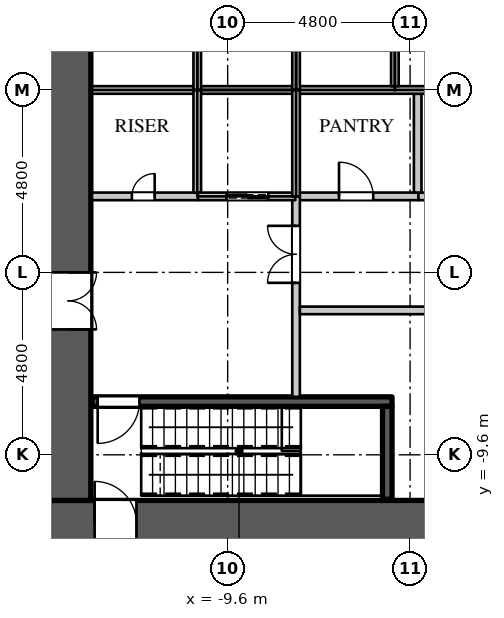
"""IFC4 building model, lengths in metres.
Left out: names, types, materials, properties, quantities, classifications, styles, units other than length and angle.
Written with IfcOpenShell. Run it as: python <this file> out.ifc"""

import sys

from ifc_helpers import new_model, si_unit, direction, frame, frame_2d, origin, place, context, subcontext, project, spatial, rectangle, extrude, element, fill, save


model = new_model("IFC4")
c1 = context("Model", 3, precision=1e-05, world=origin(), true_north=direction((0.0, 1.0)))
c2 = subcontext(c1, "Body", "Model", "MODEL_VIEW")
j1 = project(units=[si_unit("LENGTHUNIT", "METRE"), si_unit("PLANEANGLEUNIT", "RADIAN")], contexts=[c1])
p1 = place(None, origin())
s1 = spatial("IfcSite", under=j1, at=p1, CompositionType="ELEMENT")
p2 = place(p1, origin())
s2 = spatial("IfcBuilding", under=s1, at=p2, CompositionType="ELEMENT")
p3 = place(p2, frame((0.0, 0.0, 6.0)))
s3 = spatial("IfcBuildingStorey", under=s2, at=p3, CompositionType="ELEMENT", Elevation=6.0)
p4 = place(p3, frame((-14.4, -11.4, 0.0), z_axis=(0.0, 0.0, 1.0), x_axis=(1.0, 0.0, 0.0)))
e1 = element("IfcWall", 1, at=p4, inside=s3, PredefinedType="SHEAR", context=c2, shape_type="SweptSolid", body=[
    extrude(rectangle(XDim=28.8, YDim=1.2, at=frame_2d((14.4, 0.0))), origin(), (0.0, 0.0, 1.0), 5.0),
])
p5 = place(p4, frame((1.3, 0.0, 0.0)))
e2 = element("IfcOpeningElement", 2, at=p5, cuts=e1, PredefinedType="OPENING", context=c2, shape_type="SweptSolid", body=[
    extrude(rectangle(XDim=1.1, YDim=2.2, at=frame_2d((0.55, 1.1))), frame((0.0, 0.61, 0.0), z_axis=(0.0, -1.0, 0.0), x_axis=(1.0, 0.0, 0.0)), (0.0, 0.0, 1.0), 1.22),
])
p6 = place(p4, frame((26.4, 0.0, 0.0)))
e3 = element("IfcOpeningElement", 3, at=p6, cuts=e1, PredefinedType="OPENING", context=c2, shape_type="SweptSolid", body=[
    extrude(rectangle(XDim=1.1, YDim=2.2, at=frame_2d((0.55, 1.1))), frame((0.0, 0.61, 0.0), z_axis=(0.0, -1.0, 0.0), x_axis=(1.0, 0.0, 0.0)), (0.0, 0.0, 1.0), 1.22),
])
p7 = place(p3, frame((-13.8, -10.8, 0.0), z_axis=(0.0, 0.0, 1.0), x_axis=(0.0, 1.0, 0.0)))
e4 = element("IfcWall", 4, at=p7, inside=s3, PredefinedType="SHEAR", context=c2, shape_type="SweptSolid", body=[
    extrude(rectangle(XDim=21.6, YDim=1.2, at=frame_2d((10.8, 0.0))), origin(), (0.0, 0.0, 1.0), 5.0),
])
p8 = place(p7, frame((15.5, 0.0, 0.0)))
e5 = element("IfcOpeningElement", 5, at=p8, cuts=e4, PredefinedType="OPENING", context=c2, shape_type="SweptSolid", body=[
    extrude(rectangle(XDim=1.5, YDim=2.4, at=frame_2d((0.75, 1.2))), frame((0.0, 0.61, 0.0), z_axis=(0.0, -1.0, 0.0), x_axis=(1.0, 0.0, 0.0)), (0.0, 0.0, 1.0), 1.22),
])
p9 = place(p7, frame((4.5, 0.0, 0.0)))
e6 = element("IfcOpeningElement", 6, at=p9, cuts=e4, PredefinedType="OPENING", context=c2, shape_type="SweptSolid", body=[
    extrude(rectangle(XDim=1.5, YDim=2.4, at=frame_2d((0.75, 1.2))), frame((0.0, 0.61, 0.0), z_axis=(0.0, -1.0, 0.0), x_axis=(1.0, 0.0, 0.0)), (0.0, 0.0, 1.0), 1.22),
])
p10 = place(p3, frame((-7.82, -2.8, 0.0), z_axis=(0.0, 0.0, 1.0), x_axis=(1.0, 0.0, 0.0)))
e7 = element("IfcWall", 7, at=p10, inside=s3, PredefinedType="PARTITIONING", context=c2, shape_type="SweptSolid", body=[
    extrude(rectangle(XDim=3.24, YDim=0.2, at=frame_2d((1.62, 0.0))), origin(), (0.0, 0.0, 1.0), 4.4),
])
p11 = place(p10, frame((1.15, 0.0, 0.0)))
e8 = element("IfcOpeningElement", 8, at=p11, cuts=e7, PredefinedType="OPENING", context=c2, shape_type="SweptSolid", body=[
    extrude(rectangle(XDim=0.9, YDim=2.2, at=frame_2d((0.45, 1.1))), frame((0.0, 0.11, 0.0), z_axis=(0.0, -1.0, 0.0), x_axis=(1.0, 0.0, 0.0)), (0.0, 0.0, 1.0), 0.22),
])
p12 = place(p3, frame((-7.8, -8.075, 0.0), z_axis=(0.0, 0.0, 1.0), x_axis=(0.0, 1.0, 0.0)))
e9 = element("IfcWall", 9, at=p12, inside=s3, PredefinedType="PARTITIONING", context=c2, shape_type="SweptSolid", body=[
    extrude(rectangle(XDim=5.275, YDim=0.2, at=frame_2d((2.637, 0.0))), origin(), (0.0, 0.0, 1.0), 4.4),
])
p13 = place(p12, frame((3.0, 0.0, 0.0)))
e10 = element("IfcOpeningElement", 10, at=p13, cuts=e9, PredefinedType="OPENING", context=c2, shape_type="SweptSolid", body=[
    extrude(rectangle(XDim=1.5, YDim=2.4, at=frame_2d((0.75, 1.2))), frame((0.0, 0.11, 0.0), z_axis=(0.0, -1.0, 0.0), x_axis=(1.0, 0.0, 0.0)), (0.0, 0.0, 1.0), 0.22),
])
p14 = place(p3, frame((-7.7, -5.8, 0.0), z_axis=(0.0, 0.0, 1.0), x_axis=(1.0, 0.0, 0.0)))
e11 = element("IfcWall", 11, at=p14, inside=s3, PredefinedType="PARTITIONING", context=c2, shape_type="SweptSolid", body=[
    extrude(rectangle(XDim=12.52, YDim=0.2, at=frame_2d((6.26, 0.0))), origin(), (0.0, 0.0, 1.0), 4.4),
])
p15 = place(p14, frame((3.4, 0.0, 0.0)))
e12 = element("IfcOpeningElement", 12, at=p15, cuts=e11, PredefinedType="OPENING", context=c2, shape_type="SweptSolid", body=[
    extrude(rectangle(XDim=0.9, YDim=2.2, at=frame_2d((0.45, 1.1))), frame((0.0, 0.11, 0.0), z_axis=(0.0, -1.0, 0.0), x_axis=(1.0, 0.0, 0.0)), (0.0, 0.0, 1.0), 0.22),
])
p16 = place(p14, frame((9.5, 0.0, 0.0)))
e13 = element("IfcOpeningElement", 13, at=p16, cuts=e11, PredefinedType="OPENING", context=c2, shape_type="SweptSolid", body=[
    extrude(rectangle(XDim=0.9, YDim=2.2, at=frame_2d((0.45, 1.1))), frame((0.0, 0.11, 0.0), z_axis=(0.0, -1.0, 0.0), x_axis=(1.0, 0.0, 0.0)), (0.0, 0.0, 1.0), 0.22),
])
p17 = place(p3, frame((-13.17, -2.8, 0.0), z_axis=(0.0, 0.0, 1.0), x_axis=(1.0, 0.0, 0.0)))
e14 = element("IfcWall", 14, at=p17, inside=s3, PredefinedType="PARTITIONING", context=c2, shape_type="SweptSolid", body=[
    extrude(rectangle(XDim=2.79, YDim=0.2, at=frame_2d((1.395, 0.0))), origin(), (0.0, 0.0, 1.0), 4.4),
])
p18 = place(p17, frame((1.05, 0.0, 0.0)))
e15 = element("IfcOpeningElement", 15, at=p18, cuts=e14, PredefinedType="OPENING", context=c2, shape_type="SweptSolid", body=[
    extrude(rectangle(XDim=0.6, YDim=2.0, at=frame_2d((0.3, 1.0))), frame((0.0, 0.11, 0.0), z_axis=(0.0, -1.0, 0.0), x_axis=(1.0, 0.0, 0.0)), (0.0, 0.0, 1.0), 0.22),
])
p19 = place(p3, frame((-4.58, -2.8, 0.0), z_axis=(0.0, 0.0, 1.0), x_axis=(1.0, 0.0, 0.0)))
e16 = element("IfcWall", 16, at=p19, inside=s3, PredefinedType="PARTITIONING", context=c2, shape_type="SweptSolid", body=[
    extrude(rectangle(XDim=2.36, YDim=0.2, at=frame_2d((1.18, 0.0))), origin(), (0.0, 0.0, 1.0), 4.4),
])
p20 = place(p19, frame((0.7, 0.0, 0.0)))
e17 = element("IfcOpeningElement", 17, at=p20, cuts=e16, PredefinedType="OPENING", context=c2, shape_type="SweptSolid", body=[
    extrude(rectangle(XDim=0.9, YDim=2.2, at=frame_2d((0.45, 1.1))), frame((0.0, 0.11, 0.0), z_axis=(0.0, -1.0, 0.0), x_axis=(1.0, 0.0, 0.0)), (0.0, 0.0, 1.0), 0.22),
])
p21 = place(p3, frame((-4.6, -2.7, 0.0), z_axis=(0.0, 0.0, 1.0), x_axis=(0.0, 1.0, 0.0)))
e18 = element("IfcWall", 18, at=p21, inside=s3, PredefinedType="PARTITIONING", context=c2, shape_type="SweptSolid", body=[
    extrude(rectangle(XDim=2.6, YDim=0.2, at=frame_2d((1.3, 0.0))), origin(), (0.0, 0.0, 1.0), 4.4),
])
p22 = place(p3, frame((-13.17, 0.0, 0.0), z_axis=(0.0, 0.0, 1.0), x_axis=(1.0, 0.0, 0.0)))
e19 = element("IfcWall", 19, at=p22, inside=s3, PredefinedType="PARTITIONING", context=c2, shape_type="SweptSolid", body=[
    extrude(rectangle(XDim=23.57, YDim=0.2, at=frame_2d((11.785, 0.0))), origin(), (0.0, 0.0, 1.0), 4.4),
])
p23 = place(p3, frame((-10.4, -2.7, 0.0), z_axis=(0.0, 0.0, 1.0), x_axis=(0.0, 1.0, 0.0)))
e20 = element("IfcWall", 20, at=p23, inside=s3, PredefinedType="PARTITIONING", context=c2, shape_type="SweptSolid", body=[
    extrude(rectangle(XDim=2.7, YDim=0.2, at=frame_2d((1.35, 0.0))), origin(), (0.0, 0.0, 1.0), 4.4),
])
p24 = place(p3, frame((-10.38, -2.8, 0.0), z_axis=(0.0, 0.0, 1.0), x_axis=(1.0, 0.0, 0.0)))
e21 = element("IfcWall", 21, at=p24, inside=s3, PredefinedType="PARTITIONING", context=c2, shape_type="SweptSolid", body=[
    extrude(rectangle(XDim=2.56, YDim=0.2, at=frame_2d((1.28, 0.0))), origin(), (0.0, 0.0, 1.0), 4.4),
])
p25 = place(p24, frame((0.75, 0.0, 0.0)))
e22 = element("IfcOpeningElement", 22, at=p25, cuts=e21, PredefinedType="OPENING", context=c2, shape_type="SweptSolid", body=[
    extrude(rectangle(XDim=1.1, YDim=2.2, at=frame_2d((0.55, 1.1))), frame((0.0, 0.11, 0.0), z_axis=(0.0, -1.0, 0.0), x_axis=(1.0, 0.0, 0.0)), (0.0, 0.0, 1.0), 0.22),
])
p26 = place(p3, frame((-10.4, 0.0, 0.0), z_axis=(0.0, 0.0, 1.0), x_axis=(0.0, 1.0, 0.0)))
e23 = element("IfcWall", 23, at=p26, inside=s3, PredefinedType="PARTITIONING", context=c2, shape_type="SweptSolid", body=[
    extrude(rectangle(XDim=2.7, YDim=0.2, at=frame_2d((1.35, 0.0))), origin(), (0.0, 0.0, 1.0), 4.4),
])
for number, where, z_axis, x_axis in (
    (24, (-7.8, -2.8, 0.0), (0.0, 0.0, 1.0), (0.0, 1.0, 0.0)),
    (25, (-7.8, 0.0, 0.0), (0.0, 0.0, 1.0), (0.0, 1.0, 0.0)),
):
    element("IfcWall", number, at=place(p3, frame(where, z_axis=z_axis, x_axis=x_axis)), inside=s3, PredefinedType="PARTITIONING", context=c2, shape_type="SweptSolid", body=[
        extrude(rectangle(XDim=2.8, YDim=0.2, at=frame_2d((1.4, 0.0))), origin(), (0.0, 0.0, 1.0), 4.4),
    ])
p27 = place(p3, frame((-5.2, 0.1, 0.0), z_axis=(0.0, 0.0, 1.0), x_axis=(0.0, 1.0, 0.0)))
e26 = element("IfcWall", 26, at=p27, inside=s3, PredefinedType="PARTITIONING", context=c2, shape_type="SweptSolid", body=[
    extrude(rectangle(XDim=2.6, YDim=0.2, at=frame_2d((1.3, 0.0))), origin(), (0.0, 0.0, 1.0), 4.4),
])
p28 = place(p3, frame((-13.17, -8.2, 0.0), z_axis=(0.0, 0.0, 1.0), x_axis=(1.0, 0.0, 0.0)))
e27 = element("IfcWall", 27, at=p28, inside=s3, PredefinedType="SHEAR", context=c2, shape_type="SweptSolid", body=[
    extrude(rectangle(XDim=7.895, YDim=0.25, at=frame_2d((3.948, 0.0))), origin(), (0.0, 0.0, 1.0), 4.65),
])
p29 = place(p28, frame((0.15, 0.0, 0.0)))
e28 = element("IfcOpeningElement", 28, at=p29, cuts=e27, PredefinedType="OPENING", context=c2, shape_type="SweptSolid", body=[
    extrude(rectangle(XDim=1.1, YDim=2.2, at=frame_2d((0.55, 1.1))), frame((0.0, 0.135, 0.0), z_axis=(0.0, -1.0, 0.0), x_axis=(1.0, 0.0, 0.0)), (0.0, 0.0, 1.0), 0.27),
])
p30 = place(p3, frame((-5.4, -10.77, 0.0), z_axis=(0.0, 0.0, 1.0), x_axis=(0.0, 1.0, 0.0)))
e29 = element("IfcWall", 29, at=p30, inside=s3, PredefinedType="SHEAR", context=c2, shape_type="SweptSolid", body=[
    extrude(rectangle(XDim=2.445, YDim=0.25, at=frame_2d((1.223, 0.0))), origin(), (0.0, 0.0, 1.0), 4.65),
])
p31 = place(p18, origin())
e30 = element("IfcDoor", 30, at=p31, inside=s3, OperationType="SINGLE_SWING_RIGHT", PredefinedType="DOOR", context=c2, shape_type="SweptSolid", body=[
    extrude(rectangle(XDim=0.6, YDim=2.0, at=frame_2d((0.3, 1.0))), frame((0.0, 0.025, 0.0), z_axis=(0.0, -1.0, 0.0), x_axis=(1.0, 0.0, 0.0)), (0.0, 0.0, 1.0), 0.05),
])
fill(e15, e30)
p32 = place(p11, origin())
e31 = element("IfcDoor", 31, at=p32, inside=s3, OperationType="SINGLE_SWING_LEFT", PredefinedType="DOOR", context=c2, shape_type="SweptSolid", body=[
    extrude(rectangle(XDim=0.9, YDim=2.2, at=frame_2d((0.45, 1.1))), frame((0.0, 0.025, 0.0), z_axis=(0.0, -1.0, 0.0), x_axis=(1.0, 0.0, 0.0)), (0.0, 0.0, 1.0), 0.05),
])
fill(e8, e31)
p33 = place(p25, origin())
e32 = element("IfcDoor", 32, at=p33, inside=s3, OperationType="DOUBLE_DOOR_SLIDING", PredefinedType="DOOR", context=c2, shape_type="SweptSolid", body=[
    extrude(rectangle(XDim=1.1, YDim=2.2, at=frame_2d((0.55, 1.1))), frame((0.0, 0.025, 0.0), z_axis=(0.0, -1.0, 0.0), x_axis=(1.0, 0.0, 0.0)), (0.0, 0.0, 1.0), 0.05),
])
fill(e22, e32)
p34 = place(p29, origin())
e33 = element("IfcDoor", 33, at=p34, inside=s3, OperationType="SINGLE_SWING_RIGHT", PredefinedType="DOOR", context=c2, shape_type="SweptSolid", body=[
    extrude(rectangle(XDim=1.1, YDim=2.2, at=frame_2d((0.55, 1.1))), frame((0.0, 0.025, 0.0), z_axis=(0.0, -1.0, 0.0), x_axis=(1.0, 0.0, 0.0)), (0.0, 0.0, 1.0), 0.05),
])
fill(e28, e33)
p35 = place(p13, origin())
e34 = element("IfcDoor", 34, at=p35, inside=s3, OperationType="DOUBLE_DOOR_SINGLE_SWING", PredefinedType="DOOR", context=c2, shape_type="SweptSolid", body=[
    extrude(rectangle(XDim=1.5, YDim=2.4, at=frame_2d((0.75, 1.2))), frame((0.0, 0.025, 0.0), z_axis=(0.0, -1.0, 0.0), x_axis=(1.0, 0.0, 0.0)), (0.0, 0.0, 1.0), 0.05),
])
fill(e10, e34)
p36 = place(p9, origin())
e35 = element("IfcDoor", 35, at=p36, inside=s3, OperationType="DOUBLE_DOOR_SINGLE_SWING", PredefinedType="DOOR", context=c2, shape_type="SweptSolid", body=[
    extrude(rectangle(XDim=1.5, YDim=2.4, at=frame_2d((0.75, 1.2))), frame((0.0, 0.025, 0.0), z_axis=(0.0, -1.0, 0.0), x_axis=(1.0, 0.0, 0.0)), (0.0, 0.0, 1.0), 0.05),
])
fill(e6, e35)
p37 = place(p5, origin())
e36 = element("IfcDoor", 36, at=p37, inside=s3, OperationType="SINGLE_SWING_LEFT", PredefinedType="DOOR", context=c2, shape_type="SweptSolid", body=[
    extrude(rectangle(XDim=1.1, YDim=2.2, at=frame_2d((0.55, 1.1))), frame((0.0, 0.025, 0.0), z_axis=(0.0, -1.0, 0.0), x_axis=(1.0, 0.0, 0.0)), (0.0, 0.0, 1.0), 0.05),
])
fill(e2, e36)
save(model, sys.argv[1])
